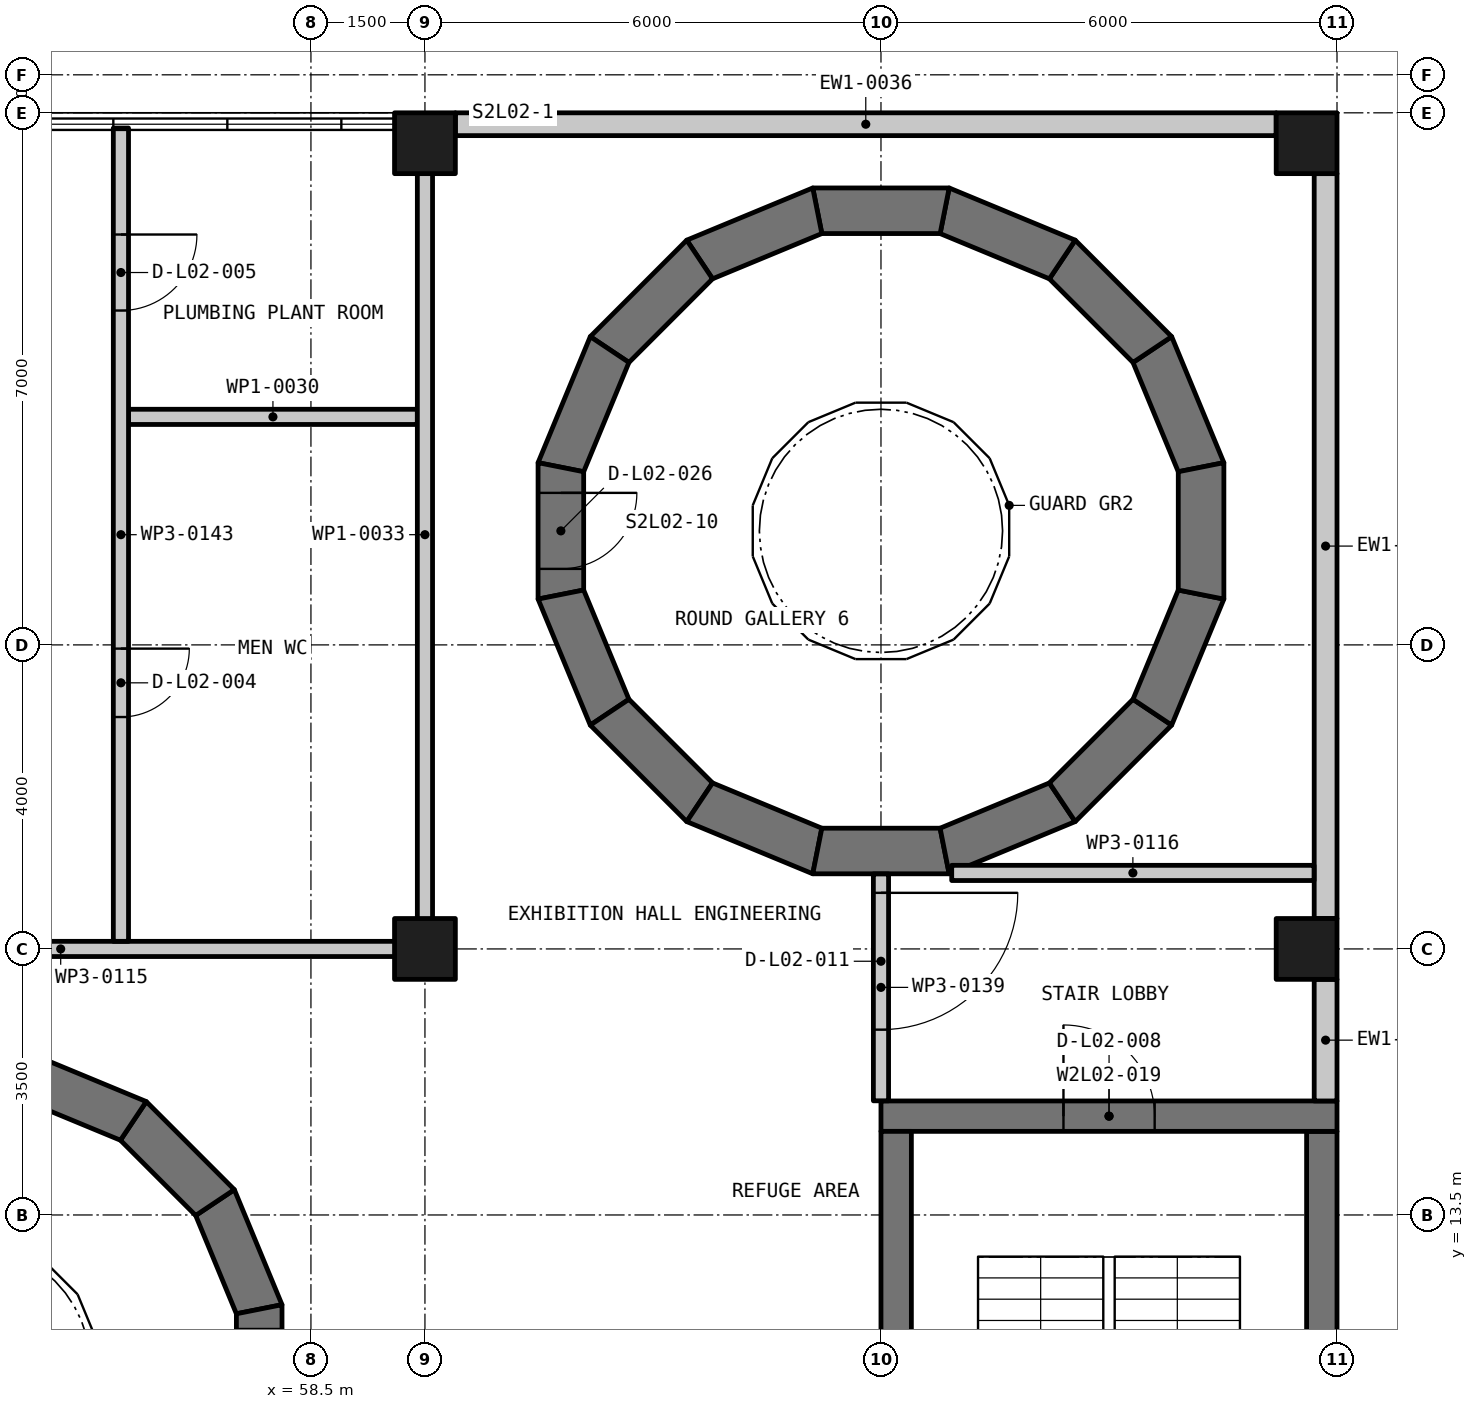
"""IFC4 building model, lengths in metres.
Left out: names, types, materials, properties, quantities, classifications, styles, units other than length and angle.
Written with IfcOpenShell. Run it as: python <this file> out.ifc"""

import sys

from ifc_helpers import new_model, si_unit, direction, frame, frame_2d, origin, origin_2d, place, context, subcontext, project, spatial, polyline, rectangle, outline, extrude, element, fill, save


model = new_model("IFC4")
c1 = context("Model", 3, precision=1e-05, world=origin(), true_north=direction((0.0, 1.0)))
c2 = subcontext(c1, "Body", "Model", "MODEL_VIEW")
j1 = project(units=[si_unit("LENGTHUNIT", "METRE"), si_unit("PLANEANGLEUNIT", "RADIAN")], contexts=[c1])
p1 = place(None, origin())
s1 = spatial("IfcSite", under=j1, at=p1, CompositionType="ELEMENT")
p2 = place(p1, origin())
s2 = spatial("IfcBuilding", under=s1, at=p2, CompositionType="ELEMENT")
p3 = place(p2, frame((0.0, 0.0, 11.25)))
s3 = spatial("IfcBuildingStorey", under=s2, at=p3, CompositionType="ELEMENT", Elevation=11.25)
p4 = place(p3, frame((60.0, 17.0, -0.3), z_axis=(0.0, 0.0, 1.0), x_axis=(1.0, 0.0, 0.0)))
e1 = element("IfcColumn", 1, at=p4, inside=s3, PredefinedType="COLUMN", context=c2, shape_type="SweptSolid", body=[
    extrude(rectangle(XDim=0.8, YDim=0.8, at=origin_2d()), origin(), (0.0, 0.0, 1.0), 4.05),
])
p5 = place(p3, frame((60.0, 27.6, -0.3), z_axis=(0.0, 0.0, 1.0), x_axis=(1.0, 0.0, 0.0)))
e2 = element("IfcColumn", 2, at=p5, inside=s3, PredefinedType="COLUMN", context=c2, shape_type="SweptSolid", body=[
    extrude(rectangle(XDim=0.8, YDim=0.8, at=origin_2d()), origin(), (0.0, 0.0, 1.0), 4.16),
])
p6 = place(p3, frame((71.6, 17.0, -0.3), z_axis=(0.0, 0.0, 1.0), x_axis=(1.0, 0.0, 0.0)))
e3 = element("IfcColumn", 3, at=p6, inside=s3, PredefinedType="COLUMN", context=c2, shape_type="SweptSolid", body=[
    extrude(rectangle(XDim=0.8, YDim=0.8, at=origin_2d()), origin(), (0.0, 0.0, 1.0), 4.05),
])
p7 = place(p3, frame((71.6, 27.6, -0.3), z_axis=(0.0, 0.0, 1.0), x_axis=(1.0, 0.0, 0.0)))
e4 = element("IfcColumn", 4, at=p7, inside=s3, PredefinedType="COLUMN", context=c2, shape_type="SweptSolid", body=[
    extrude(rectangle(XDim=0.8, YDim=0.8, at=origin_2d()), origin(), (0.0, 0.0, 1.0), 4.16),
])
p8 = place(p3, frame((57.842, 12.205, -0.3), z_axis=(0.0, 0.0, 1.0), x_axis=(-0.382614973625, 0.923907886078, 0.0)))
e5 = element("IfcWall", 5, at=p8, inside=s3, PredefinedType="SHEAR", context=c2, shape_type="SweptSolid", body=[
    extrude(outline(polyline([(0.0, -0.3), (1.639, -0.3), (1.519, 0.3), (0.119, 0.3), (0.0, -0.3)])), origin(), (0.0, 0.0, 1.0), 4.5),
])
p9 = place(p3, frame((57.28, 13.621, -0.3), z_axis=(0.0, 0.0, 1.0), x_axis=(-0.707106781187, 0.707106781187, 0.0)))
e6 = element("IfcWall", 6, at=p9, inside=s3, PredefinedType="SHEAR", context=c2, shape_type="SweptSolid", body=[
    extrude(outline(polyline([(0.0, -0.3), (1.639, -0.3), (1.519, 0.3), (0.119, 0.3), (0.0, -0.3)])), origin(), (0.0, 0.0, 1.0), 4.5),
])
p10 = place(p3, frame((56.219, 14.715, -0.3), z_axis=(0.0, 0.0, 1.0), x_axis=(-0.923907886078, 0.382614973625, 0.0)))
e7 = element("IfcWall", 7, at=p10, inside=s3, PredefinedType="SHEAR", context=c2, shape_type="SweptSolid", body=[
    extrude(outline(polyline([(-0.0, -0.3), (1.639, -0.3), (1.519, 0.3), (0.119, 0.3), (-0.0, -0.3)])), origin(), (0.0, 0.0, 1.0), 4.5),
])
p11 = place(p3, frame((57.819, 10.681, -0.3), z_axis=(0.0, 0.0, 1.0), x_axis=(0.0, 1.0, 0.0)))
e8 = element("IfcWall", 8, at=p11, inside=s3, PredefinedType="SHEAR", context=c2, shape_type="SweptSolid", body=[
    extrude(outline(polyline([(0.0, -0.3), (1.639, -0.3), (1.519, 0.3), (0.119, 0.3), (0.0, -0.3)])), origin(), (0.0, 0.0, 1.0), 4.5),
])
p12 = place(p11, frame((0.319, 0.0, 0.3)))
e9 = element("IfcOpeningElement", 9, at=p12, cuts=e8, PredefinedType="OPENING", context=c2, shape_type="SweptSolid", body=[
    extrude(rectangle(XDim=1.0, YDim=2.2, at=frame_2d((0.5, 1.1))), frame((0.0, 0.31, 0.0), z_axis=(0.0, -1.0, 0.0), x_axis=(1.0, 0.0, 0.0)), (0.0, 0.0, 1.0), 0.62),
])
p13 = place(p3, frame((70.234, 23.283, -0.3), z_axis=(0.0, 0.0, 1.0), x_axis=(-0.3826441282, 0.92389581185, 0.0)))
e10 = element("IfcWall", 10, at=p13, inside=s3, PredefinedType="SHEAR", context=c2, shape_type="SweptSolid", body=[
    extrude(outline(polyline([(0.0, -0.3), (1.795, -0.3), (1.675, 0.3), (0.119, 0.3), (0.0, -0.3)])), origin(), (0.0, 0.0, 1.0), 4.5),
])
p14 = place(p3, frame((69.613, 24.844, -0.3), z_axis=(0.0, 0.0, 1.0), x_axis=(-0.707106781187, 0.707106781187, 0.0)))
e11 = element("IfcWall", 11, at=p14, inside=s3, PredefinedType="SHEAR", context=c2, shape_type="SweptSolid", body=[
    extrude(outline(polyline([(0.0, -0.3), (1.795, -0.3), (1.675, 0.3), (0.119, 0.3), (0.0, -0.3)])), origin(), (0.0, 0.0, 1.0), 4.5),
])
p15 = place(p3, frame((68.441, 26.048, -0.3), z_axis=(0.0, 0.0, 1.0), x_axis=(-0.92389581185, 0.3826441282, 0.0)))
e12 = element("IfcWall", 12, at=p15, inside=s3, PredefinedType="SHEAR", context=c2, shape_type="SweptSolid", body=[
    extrude(outline(polyline([(0.0, -0.3), (1.795, -0.3), (1.676, 0.3), (0.119, 0.3), (0.0, -0.3)])), origin(), (0.0, 0.0, 1.0), 4.5),
])
p16 = place(p3, frame((66.897, 26.712, -0.3), z_axis=(0.0, 0.0, 1.0), x_axis=(-1.0, 0.0, 0.0)))
e13 = element("IfcWall", 13, at=p16, inside=s3, PredefinedType="SHEAR", context=c2, shape_type="SweptSolid", body=[
    extrude(outline(polyline([(0.0, -0.3), (1.795, -0.3), (1.676, 0.3), (0.119, 0.3), (0.0, -0.3)])), origin(), (0.0, 0.0, 1.0), 4.5),
])
p17 = place(p3, frame((65.217, 26.734, -0.3), z_axis=(0.0, 0.0, 1.0), x_axis=(-0.92389581185, -0.3826441282, 0.0)))
e14 = element("IfcWall", 14, at=p17, inside=s3, PredefinedType="SHEAR", context=c2, shape_type="SweptSolid", body=[
    extrude(outline(polyline([(0.0, -0.3), (1.795, -0.3), (1.675, 0.3), (0.119, 0.3), (0.0, -0.3)])), origin(), (0.0, 0.0, 1.0), 4.5),
])
p18 = place(p3, frame((63.656, 26.113, -0.3), z_axis=(0.0, 0.0, 1.0), x_axis=(-0.707106781187, -0.707106781187, 0.0)))
e15 = element("IfcWall", 15, at=p18, inside=s3, PredefinedType="SHEAR", context=c2, shape_type="SweptSolid", body=[
    extrude(outline(polyline([(0.0, -0.3), (1.795, -0.3), (1.675, 0.3), (0.119, 0.3), (0.0, -0.3)])), origin(), (0.0, 0.0, 1.0), 4.5),
])
p19 = place(p3, frame((62.452, 24.941, -0.3), z_axis=(0.0, 0.0, 1.0), x_axis=(-0.3826441282, -0.92389581185, 0.0)))
e16 = element("IfcWall", 16, at=p19, inside=s3, PredefinedType="SHEAR", context=c2, shape_type="SweptSolid", body=[
    extrude(outline(polyline([(0.0, -0.3), (1.795, -0.3), (1.676, 0.3), (0.119, 0.3), (0.0, -0.3)])), origin(), (0.0, 0.0, 1.0), 4.5),
])
p20 = place(p3, frame((61.788, 23.397, -0.3), z_axis=(0.0, 0.0, 1.0), x_axis=(0.0, -1.0, 0.0)))
e17 = element("IfcWall", 17, at=p20, inside=s3, PredefinedType="SHEAR", context=c2, shape_type="SweptSolid", body=[
    extrude(outline(polyline([(0.0, -0.3), (1.795, -0.3), (1.676, 0.3), (0.119, 0.3), (0.0, -0.3)])), origin(), (0.0, 0.0, 1.0), 4.5),
])
p21 = place(p20, frame((0.397, 0.0, 0.3)))
e18 = element("IfcOpeningElement", 18, at=p21, cuts=e17, PredefinedType="OPENING", context=c2, shape_type="SweptSolid", body=[
    extrude(rectangle(XDim=1.0, YDim=2.2, at=frame_2d((0.5, 1.1))), frame((0.0, 0.31, 0.0), z_axis=(0.0, -1.0, 0.0), x_axis=(1.0, 0.0, 0.0)), (0.0, 0.0, 1.0), 0.62),
])
p22 = place(p3, frame((61.766, 21.717, -0.3), z_axis=(0.0, 0.0, 1.0), x_axis=(0.3826441282, -0.92389581185, 0.0)))
e19 = element("IfcWall", 19, at=p22, inside=s3, PredefinedType="SHEAR", context=c2, shape_type="SweptSolid", body=[
    extrude(outline(polyline([(0.0, -0.3), (1.795, -0.3), (1.675, 0.3), (0.119, 0.3), (0.0, -0.3)])), origin(), (0.0, 0.0, 1.0), 4.5),
])
p23 = place(p3, frame((62.387, 20.156, -0.3), z_axis=(0.0, 0.0, 1.0), x_axis=(0.707106781187, -0.707106781187, 0.0)))
e20 = element("IfcWall", 20, at=p23, inside=s3, PredefinedType="SHEAR", context=c2, shape_type="SweptSolid", body=[
    extrude(outline(polyline([(0.0, -0.3), (1.795, -0.3), (1.675, 0.3), (0.119, 0.3), (0.0, -0.3)])), origin(), (0.0, 0.0, 1.0), 4.5),
])
p24 = place(p3, frame((63.559, 18.952, -0.3), z_axis=(0.0, 0.0, 1.0), x_axis=(0.92389581185, -0.3826441282, 0.0)))
e21 = element("IfcWall", 21, at=p24, inside=s3, PredefinedType="SHEAR", context=c2, shape_type="SweptSolid", body=[
    extrude(outline(polyline([(0.0, -0.3), (1.795, -0.3), (1.676, 0.3), (0.119, 0.3), (0.0, -0.3)])), origin(), (0.0, 0.0, 1.0), 4.5),
])
p25 = place(p3, frame((65.103, 18.288, -0.3), z_axis=(0.0, 0.0, 1.0), x_axis=(1.0, 0.0, 0.0)))
e22 = element("IfcWall", 22, at=p25, inside=s3, PredefinedType="SHEAR", context=c2, shape_type="SweptSolid", body=[
    extrude(outline(polyline([(0.0, -0.3), (1.795, -0.3), (1.676, 0.3), (0.119, 0.3), (0.0, -0.3)])), origin(), (0.0, 0.0, 1.0), 4.5),
])
p26 = place(p3, frame((66.783, 18.266, -0.3), z_axis=(0.0, 0.0, 1.0), x_axis=(0.92389581185, 0.3826441282, 0.0)))
e23 = element("IfcWall", 23, at=p26, inside=s3, PredefinedType="SHEAR", context=c2, shape_type="SweptSolid", body=[
    extrude(outline(polyline([(0.0, -0.3), (1.795, -0.3), (1.675, 0.3), (0.119, 0.3), (0.0, -0.3)])), origin(), (0.0, 0.0, 1.0), 4.5),
])
p27 = place(p3, frame((68.344, 18.887, -0.3), z_axis=(0.0, 0.0, 1.0), x_axis=(0.707106781187, 0.707106781187, 0.0)))
e24 = element("IfcWall", 24, at=p27, inside=s3, PredefinedType="SHEAR", context=c2, shape_type="SweptSolid", body=[
    extrude(outline(polyline([(0.0, -0.3), (1.795, -0.3), (1.675, 0.3), (0.119, 0.3), (0.0, -0.3)])), origin(), (0.0, 0.0, 1.0), 4.5),
])
p28 = place(p3, frame((69.548, 20.059, -0.3), z_axis=(0.0, 0.0, 1.0), x_axis=(0.3826441282, 0.92389581185, 0.0)))
e25 = element("IfcWall", 25, at=p28, inside=s3, PredefinedType="SHEAR", context=c2, shape_type="SweptSolid", body=[
    extrude(outline(polyline([(0.0, -0.3), (1.795, -0.3), (1.676, 0.3), (0.119, 0.3), (0.0, -0.3)])), origin(), (0.0, 0.0, 1.0), 4.5),
])
p29 = place(p3, frame((70.212, 21.603, -0.3), z_axis=(0.0, 0.0, 1.0), x_axis=(0.0, 1.0, 0.0)))
e26 = element("IfcWall", 26, at=p29, inside=s3, PredefinedType="SHEAR", context=c2, shape_type="SweptSolid", body=[
    extrude(outline(polyline([(0.0, -0.3), (1.795, -0.3), (1.676, 0.3), (0.119, 0.3), (0.0, -0.3)])), origin(), (0.0, 0.0, 1.0), 4.5),
])
p30 = place(p3, frame((71.8, 6.4, -0.3), z_axis=(0.0, 0.0, 1.0), x_axis=(0.0, 1.0, 0.0)))
e27 = element("IfcWall", 27, at=p30, inside=s3, PredefinedType="SHEAR", context=c2, shape_type="SweptSolid", body=[
    extrude(rectangle(XDim=8.2, YDim=0.4, at=frame_2d((4.1, 0.0))), origin(), (0.0, 0.0, 1.0), 4.5),
])
p31 = place(p3, frame((66.0, 14.8, -0.3), z_axis=(0.0, 0.0, 1.0), x_axis=(1.0, 0.0, 0.0)))
e28 = element("IfcWall", 28, at=p31, inside=s3, PredefinedType="SHEAR", context=c2, shape_type="SweptSolid", body=[
    extrude(rectangle(XDim=6.0, YDim=0.4, at=frame_2d((3.0, 0.0))), origin(), (0.0, 0.0, 1.0), 4.5),
])
p32 = place(p31, frame((2.401, 0.0, 0.3)))
e29 = element("IfcOpeningElement", 29, at=p32, cuts=e28, PredefinedType="OPENING", context=c2, shape_type="SweptSolid", body=[
    extrude(rectangle(XDim=1.2, YDim=2.2, at=frame_2d((0.6, 1.1))), frame((0.0, 0.21, 0.0), z_axis=(0.0, -1.0, 0.0), x_axis=(1.0, 0.0, 0.0)), (0.0, 0.0, 1.0), 0.42),
])
p33 = place(p3, frame((66.2, 6.4, -0.3), z_axis=(0.0, 0.0, 1.0), x_axis=(0.0, 1.0, 0.0)))
e30 = element("IfcWall", 30, at=p33, inside=s3, PredefinedType="SHEAR", context=c2, shape_type="SweptSolid", body=[
    extrude(rectangle(XDim=8.2, YDim=0.4, at=frame_2d((4.1, 0.0))), origin(), (0.0, 0.0, 1.0), 4.5),
])
p34 = place(p3, frame((60.4, 27.85, 0.0), z_axis=(0.0, 0.0, 1.0), x_axis=(1.0, 0.0, 0.0)))
e31 = element("IfcWall", 31, at=p34, inside=s3, PredefinedType="SOLIDWALL", context=c2, shape_type="SweptSolid", body=[
    extrude(rectangle(XDim=10.8, YDim=0.3, at=frame_2d((5.4, 0.0))), origin(), (0.0, 0.0, 1.0), 3.86),
])
p35 = place(p3, frame((71.85, 27.2, 0.0), z_axis=(0.0, 0.0, 1.0), x_axis=(0.0, -1.0, 0.0)))
e32 = element("IfcWall", 32, at=p35, inside=s3, PredefinedType="SOLIDWALL", context=c2, shape_type="SweptSolid", body=[
    extrude(rectangle(XDim=9.8, YDim=0.3, at=frame_2d((4.9, 0.0))), origin(), (0.0, 0.0, 1.0), 4.35),
])
p36 = place(p3, frame((71.85, 16.6, 0.0), z_axis=(0.0, 0.0, 1.0), x_axis=(0.0, -1.0, 0.0)))
e33 = element("IfcWall", 33, at=p36, inside=s3, PredefinedType="SOLIDWALL", context=c2, shape_type="SweptSolid", body=[
    extrude(rectangle(XDim=1.6, YDim=0.3, at=frame_2d((0.8, 0.0))), origin(), (0.0, 0.0, 1.0), 4.35),
])
p37 = place(p3, frame((5.9, 17.0, 0.0), z_axis=(0.0, 0.0, 1.0), x_axis=(1.0, 0.0, 0.0)))
e34 = element("IfcWall", 34, at=p37, inside=s3, PredefinedType="PARTITIONING", context=c2, shape_type="SweptSolid", body=[
    extrude(rectangle(XDim=54.2, YDim=0.2, at=frame_2d((27.1, 0.0))), origin(), (0.0, 0.0, 1.0), 3.75),
])
p38 = place(p37, frame((12.3, 0.0, 0.0)))
e35 = element("IfcOpeningElement", 35, at=p38, cuts=e34, PredefinedType="OPENING", context=c2, shape_type="SweptSolid", body=[
    extrude(rectangle(XDim=2.0, YDim=2.1, at=frame_2d((1.0, 1.05))), frame((0.0, 0.11, 0.0), z_axis=(0.0, -1.0, 0.0), x_axis=(1.0, 0.0, 0.0)), (0.0, 0.0, 1.0), 0.22),
])
p39 = place(p37, frame((20.599, 0.0, 0.0)))
e36 = element("IfcOpeningElement", 36, at=p39, cuts=e34, PredefinedType="OPENING", context=c2, shape_type="SweptSolid", body=[
    extrude(rectangle(XDim=2.0, YDim=2.1, at=frame_2d((1.0, 1.05))), frame((0.0, 0.11, 0.0), z_axis=(0.0, -1.0, 0.0), x_axis=(1.0, 0.0, 0.0)), (0.0, 0.0, 1.0), 0.22),
])
p40 = place(p37, frame((47.35, 0.0, 0.0)))
e37 = element("IfcOpeningElement", 37, at=p40, cuts=e34, PredefinedType="OPENING", context=c2, shape_type="SweptSolid", body=[
    extrude(rectangle(XDim=1.5, YDim=2.1, at=frame_2d((0.75, 1.05))), frame((0.0, 0.11, 0.0), z_axis=(0.0, -1.0, 0.0), x_axis=(1.0, 0.0, 0.0)), (0.0, 0.0, 1.0), 0.22),
])
p41 = place(p3, frame((66.931, 18.0, 0.0), z_axis=(0.0, 0.0, 1.0), x_axis=(1.0, 0.0, 0.0)))
e38 = element("IfcWall", 38, at=p41, inside=s3, PredefinedType="PARTITIONING", context=c2, shape_type="SweptSolid", body=[
    extrude(rectangle(XDim=4.767, YDim=0.2, at=frame_2d((2.384, 0.0))), origin(), (0.0, 0.0, 1.0), 4.35),
])
p42 = place(p3, frame((56.1, 24.0, 0.0), z_axis=(0.0, 0.0, 1.0), x_axis=(1.0, 0.0, 0.0)))
e39 = element("IfcWall", 39, at=p42, inside=s3, PredefinedType="PARTITIONING", context=c2, shape_type="SweptSolid", body=[
    extrude(rectangle(XDim=3.8, YDim=0.2, at=frame_2d((1.9, 0.0))), origin(), (0.0, 0.0, 1.0), 4.35),
])
p43 = place(p3, frame((66.0, 17.986, 0.0), z_axis=(0.0, 0.0, 1.0), x_axis=(0.0, -1.0, 0.0)))
e40 = element("IfcWall", 40, at=p43, inside=s3, PredefinedType="PARTITIONING", context=c2, shape_type="SweptSolid", body=[
    extrude(rectangle(XDim=2.984, YDim=0.2, at=frame_2d((1.492, 0.0))), origin(), (0.0, 0.0, 1.0), 3.75),
])
p44 = place(p43, frame((0.248, 0.0, 0.0)))
e41 = element("IfcOpeningElement", 41, at=p44, cuts=e40, PredefinedType="OPENING", context=c2, shape_type="SweptSolid", body=[
    extrude(rectangle(XDim=1.8, YDim=2.1, at=frame_2d((0.9, 1.05))), frame((0.0, 0.11, 0.0), z_axis=(0.0, -1.0, 0.0), x_axis=(1.0, 0.0, 0.0)), (0.0, 0.0, 1.0), 0.22),
])
p45 = place(p3, frame((60.0, 17.1, 0.0), z_axis=(0.0, 0.0, 1.0), x_axis=(0.0, 1.0, 0.0)))
e42 = element("IfcWall", 42, at=p45, inside=s3, PredefinedType="PARTITIONING", context=c2, shape_type="SweptSolid", body=[
    extrude(rectangle(XDim=10.7, YDim=0.2, at=frame_2d((5.35, 0.0))), origin(), (0.0, 0.0, 1.0), 3.86),
])
p46 = place(p3, frame((56.0, 27.8, 0.0), z_axis=(0.0, 0.0, 1.0), x_axis=(0.0, -1.0, 0.0)))
e43 = element("IfcWall", 43, at=p46, inside=s3, PredefinedType="PARTITIONING", context=c2, shape_type="SweptSolid", body=[
    extrude(rectangle(XDim=10.7, YDim=0.2, at=frame_2d((5.35, 0.0))), origin(), (0.0, 0.0, 1.0), 3.86),
])
p47 = place(p46, frame((6.849, 0.0, 0.0)))
e44 = element("IfcOpeningElement", 44, at=p47, cuts=e43, PredefinedType="OPENING", context=c2, shape_type="SweptSolid", body=[
    extrude(rectangle(XDim=0.9, YDim=2.1, at=frame_2d((0.45, 1.05))), frame((0.0, 0.11, 0.0), z_axis=(0.0, -1.0, 0.0), x_axis=(1.0, 0.0, 0.0)), (0.0, 0.0, 1.0), 0.22),
])
p48 = place(p46, frame((1.401, 0.0, 0.0)))
e45 = element("IfcOpeningElement", 45, at=p48, cuts=e43, PredefinedType="OPENING", context=c2, shape_type="SweptSolid", body=[
    extrude(rectangle(XDim=1.0, YDim=2.1, at=frame_2d((0.5, 1.05))), frame((0.0, 0.11, 0.0), z_axis=(0.0, -1.0, 0.0), x_axis=(1.0, 0.0, 0.0)), (0.0, 0.0, 1.0), 0.22),
])
p49 = place(p47, origin())
e46 = element("IfcDoor", 46, at=p49, inside=s3, OperationType="SINGLE_SWING_LEFT", PredefinedType="DOOR", context=c2, shape_type="SweptSolid", body=[
    extrude(rectangle(XDim=0.9, YDim=2.1, at=frame_2d((0.45, 1.05))), frame((0.0, 0.025, 0.0), z_axis=(0.0, -1.0, 0.0), x_axis=(1.0, 0.0, 0.0)), (0.0, 0.0, 1.0), 0.05),
])
fill(e44, e46)
p50 = place(p48, origin())
e47 = element("IfcDoor", 47, at=p50, inside=s3, OperationType="SINGLE_SWING_RIGHT", PredefinedType="DOOR", context=c2, shape_type="SweptSolid", body=[
    extrude(rectangle(XDim=1.0, YDim=2.1, at=frame_2d((0.5, 1.05))), frame((0.0, 0.025, 0.0), z_axis=(0.0, -1.0, 0.0), x_axis=(1.0, 0.0, 0.0)), (0.0, 0.0, 1.0), 0.05),
])
fill(e45, e47)
p51 = place(p32, origin())
e48 = element("IfcDoor", 48, at=p51, inside=s3, OperationType="SINGLE_SWING_RIGHT", PredefinedType="DOOR", context=c2, shape_type="SweptSolid", body=[
    extrude(rectangle(XDim=1.2, YDim=2.2, at=frame_2d((0.6, 1.1))), frame((0.0, 0.025, 0.0), z_axis=(0.0, -1.0, 0.0), x_axis=(1.0, 0.0, 0.0)), (0.0, 0.0, 1.0), 0.05),
])
fill(e29, e48)
p52 = place(p44, origin())
e49 = element("IfcDoor", 49, at=p52, inside=s3, OperationType="DOUBLE_DOOR_SINGLE_SWING", PredefinedType="DOOR", context=c2, shape_type="SweptSolid", body=[
    extrude(rectangle(XDim=1.8, YDim=2.1, at=frame_2d((0.9, 1.05))), frame((0.0, 0.025, 0.0), z_axis=(0.0, -1.0, 0.0), x_axis=(1.0, 0.0, 0.0)), (0.0, 0.0, 1.0), 0.05),
])
fill(e41, e49)
p53 = place(p21, origin())
e50 = element("IfcDoor", 50, at=p53, inside=s3, OperationType="SINGLE_SWING_LEFT", PredefinedType="DOOR", context=c2, shape_type="SweptSolid", body=[
    extrude(rectangle(XDim=1.0, YDim=2.2, at=frame_2d((0.5, 1.1))), frame((0.0, 0.025, 0.0), z_axis=(0.0, -1.0, 0.0), x_axis=(1.0, 0.0, 0.0)), (0.0, 0.0, 1.0), 0.05),
])
fill(e18, e50)
save(model, sys.argv[1])
